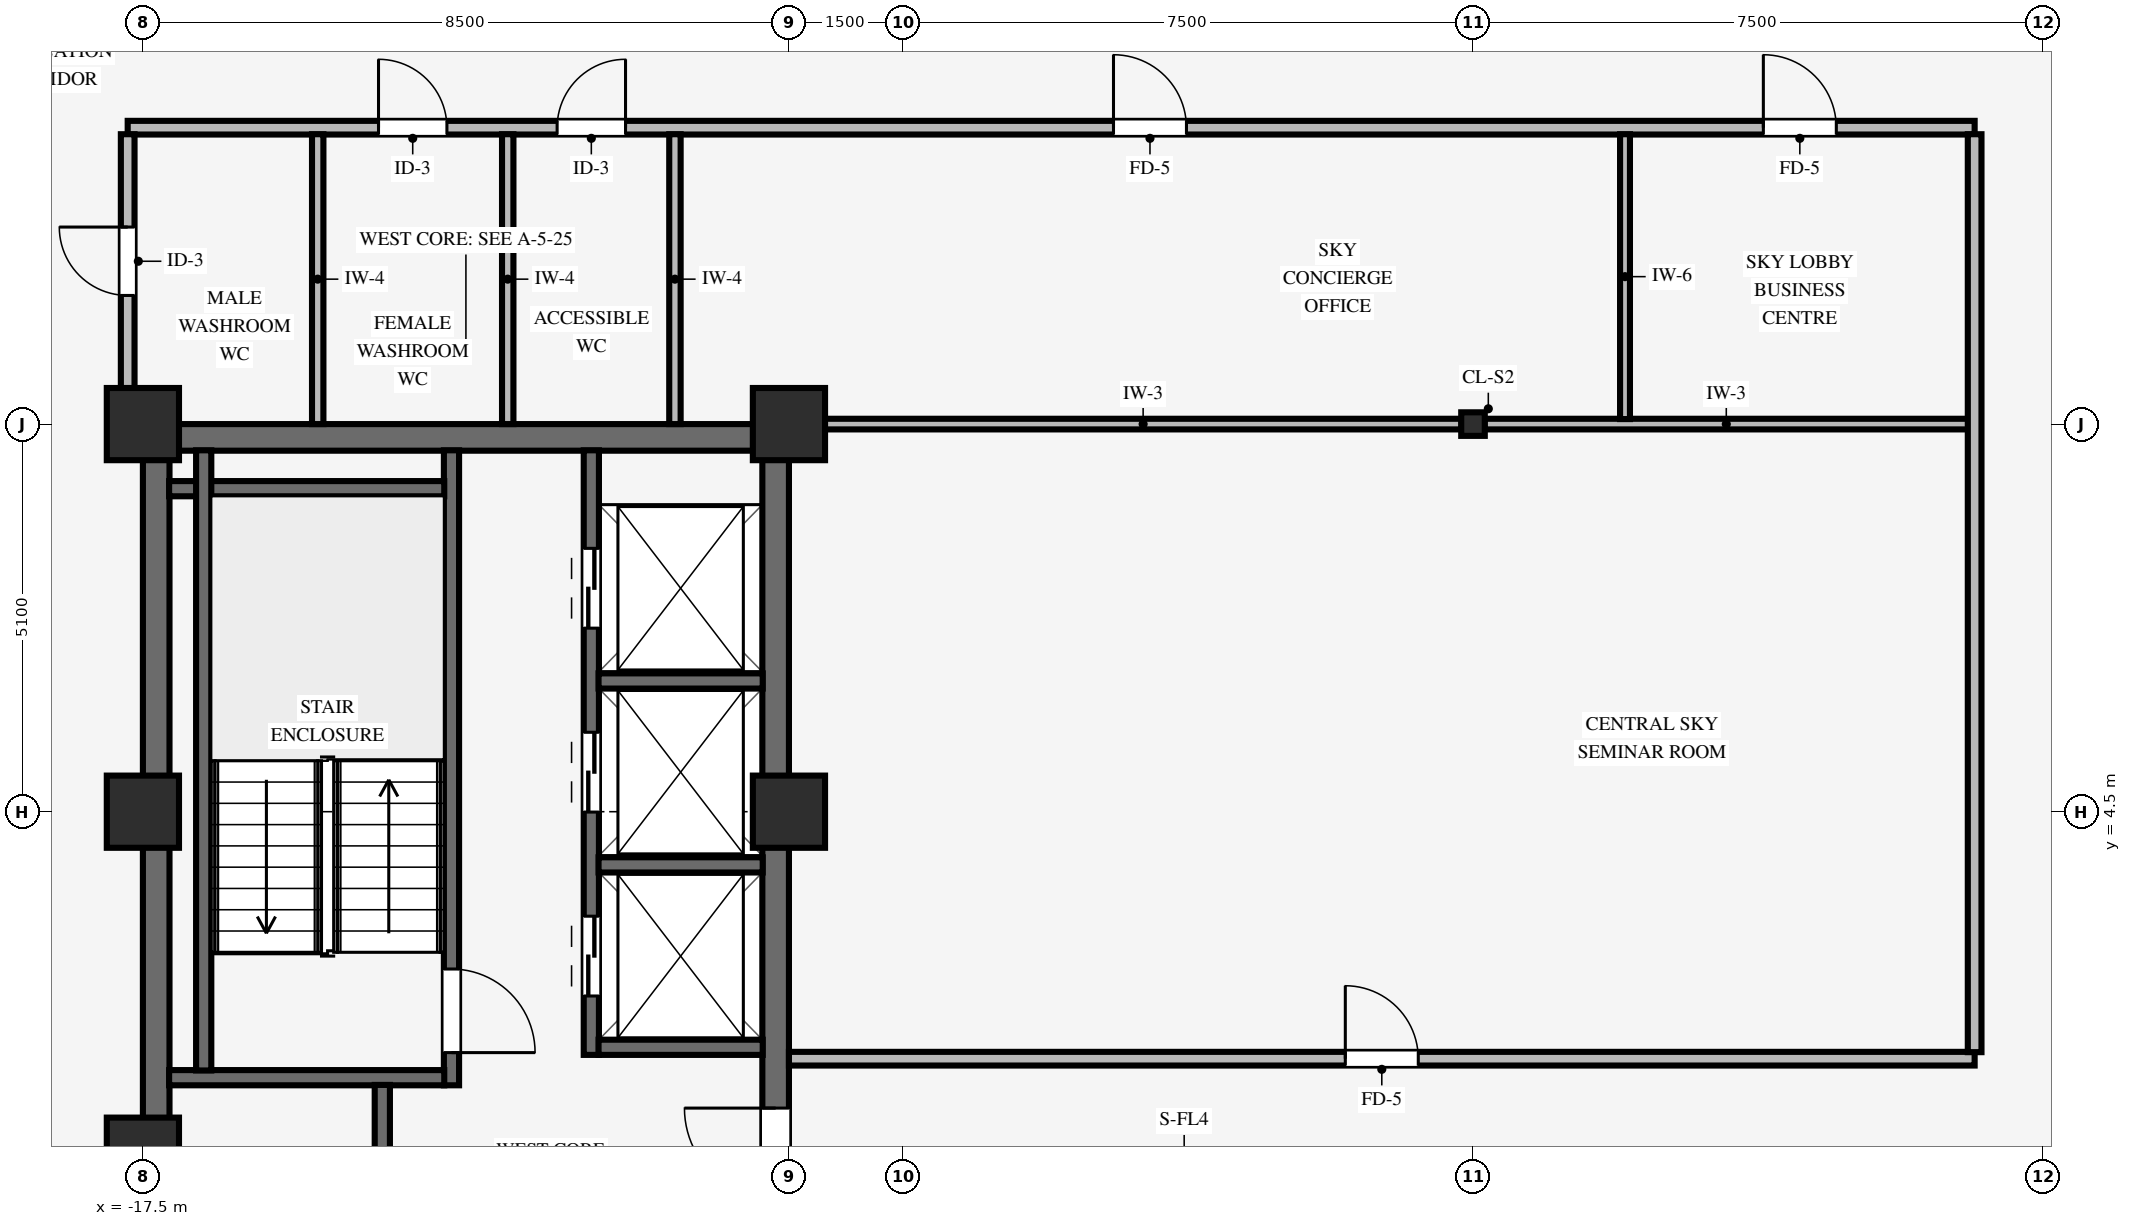
"""IFC4 building model, lengths in metres.
Left out: names, types, materials, properties, quantities, classifications, styles, units other than length and angle.
Written with IfcOpenShell. Run it as: python <this file> out.ifc"""

import sys

from ifc_helpers import new_model, si_unit, direction, frame, frame_2d, origin, origin_2d, place, context, subcontext, project, spatial, rectangle, i_section, extrude, source, transform, mapped, element, fill, save


model = new_model("IFC4")
c1 = context("Model", 3, precision=1e-05, world=origin(), true_north=direction((0.0, 1.0)))
c2 = subcontext(c1, "Body", "Model", "MODEL_VIEW")
j1 = project(units=[si_unit("LENGTHUNIT", "METRE"), si_unit("PLANEANGLEUNIT", "RADIAN")], contexts=[c1])
p1 = place(None, origin())
s1 = spatial("IfcSite", under=j1, at=p1, CompositionType="ELEMENT")
p2 = place(p1, origin())
s2 = spatial("IfcBuilding", under=s1, at=p2, CompositionType="ELEMENT")
p3 = place(p2, frame((0.0, 0.0, 223.75)))
s3 = spatial("IfcBuildingStorey", under=s2, at=p3, CompositionType="ELEMENT", Elevation=223.75)
p4 = place(p3, frame((-17.5, 9.425, 0.0), z_axis=(0.0, 0.0, 1.0), x_axis=(1.0, 0.0, 0.0)))
e1 = element("IfcWall", 1, at=p4, inside=s3, PredefinedType="SHEAR", context=c2, shape_type="SweptSolid", body=[
    extrude(rectangle(XDim=8.5, YDim=0.35, at=frame_2d((4.25, 0.0))), origin(), (0.0, 0.0, 1.0), 3.37),
])
p5 = place(p3, frame((-17.325, -9.255, 0.0), z_axis=(0.0, 0.0, 1.0), x_axis=(0.0, 1.0, 0.0)))
e2 = element("IfcWall", 2, at=p5, inside=s3, PredefinedType="SHEAR", context=c2, shape_type="SweptSolid", body=[
    extrude(rectangle(XDim=18.51, YDim=0.35, at=frame_2d((9.255, 0.0))), origin(), (0.0, 0.0, 1.0), 3.37),
])
p6 = place(p3, frame((-9.175, -9.255, 0.0), z_axis=(0.0, 0.0, 1.0), x_axis=(0.0, 1.0, 0.0)))
e3 = element("IfcWall", 3, at=p6, inside=s3, PredefinedType="SHEAR", context=c2, shape_type="SweptSolid", body=[
    extrude(rectangle(XDim=18.51, YDim=0.35, at=frame_2d((9.255, 0.0))), origin(), (0.0, 0.0, 1.0), 3.37),
])
p7 = place(p6, frame((8.655, 0.0, 0.0)))
e4 = element("IfcOpeningElement", 4, at=p7, cuts=e3, PredefinedType="OPENING", context=c2, shape_type="SweptSolid", body=[
    extrude(rectangle(XDim=1.2, YDim=2.15, at=frame_2d((0.6, 1.075))), frame((0.0, 0.185, 0.0), z_axis=(0.0, -1.0, 0.0), x_axis=(1.0, 0.0, 0.0)), (0.0, 0.0, 1.0), 0.37),
])
for number, where, z_axis, x_axis in (
    (5, (-17.5, 4.5, 0.0), (0.0, 0.0, 1.0), (1.0, 0.0, 0.0)),
    (6, (-17.5, 9.6, 0.0), (0.0, 0.0, 1.0), (1.0, 0.0, 0.0)),
    (7, (-9.0, 4.5, 0.0), (0.0, 0.0, 1.0), (1.0, 0.0, 0.0)),
    (8, (-9.0, 9.6, 0.0), (0.0, 0.0, 1.0), (1.0, 0.0, 0.0)),
    (9, (-17.5, 0.0, 0.0), (0.0, 0.0, 1.0), (1.0, 0.0, 0.0)),
):
    element("IfcColumn", number, at=place(p3, frame(where, z_axis=z_axis, x_axis=x_axis)), inside=s3, PredefinedType="COLUMN", context=c2, shape_type="SweptSolid", body=[
        extrude(rectangle(XDim=0.95, YDim=0.95, at=origin_2d()), origin(), (0.0, 0.0, 1.0), 3.37),
    ])
p8 = place(p3, frame((0.0, 9.6, 0.0), z_axis=(0.0, 0.0, 1.0), x_axis=(1.0, 0.0, 0.0)))
e10 = element("IfcColumn", 10, at=p8, inside=s3, PredefinedType="COLUMN", context=c2, shape_type="SweptSolid", body=[
    extrude(i_section(OverallWidth=0.31, OverallDepth=0.31, WebThickness=0.015, FlangeThickness=0.015, FilletRadius=0.015, at=origin_2d()), origin(), (0.0, 0.0, 1.0), 3.37),
])
p9 = place(p3, frame((-13.44, 0.9, 0.0), z_axis=(0.0, 0.0, 1.0), x_axis=(0.0, 1.0, 0.0)))
e11 = element("IfcWall", 11, at=p9, inside=s3, PredefinedType="SHEAR", context=c2, shape_type="SweptSolid", body=[
    extrude(rectangle(XDim=8.355, YDim=0.2, at=frame_2d((4.177, 0.0))), origin(), (0.0, 0.0, 1.0), 3.37),
])
p10 = place(p9, frame((1.53, 0.0, 0.0), z_axis=(0.0, 0.0, 1.0), x_axis=(-1.0, 0.0, 0.0)))
e12 = element("IfcOpeningElement", 12, at=p10, cuts=e11, PredefinedType="OPENING", context=c2, shape_type="SweptSolid", body=[
    extrude(rectangle(XDim=1.1, YDim=2.15, at=frame_2d((0.55, 1.075))), frame((0.0, 0.11, 0.0), z_axis=(0.0, -1.0, 0.0), x_axis=(1.0, 0.0, 0.0)), (0.0, 0.0, 1.0), 0.22),
])
for number, where, z_axis, x_axis in (
    (13, (-17.155, 1.0, 0.0), (0.0, 0.0, 1.0), (1.0, 0.0, 0.0)),
    (14, (-17.155, 8.75, 0.0), (0.0, 0.0, 1.0), (1.0, 0.0, 0.0)),
):
    element("IfcWall", number, at=place(p3, frame(where, z_axis=z_axis, x_axis=x_axis)), inside=s3, PredefinedType="SHEAR", context=c2, shape_type="SweptSolid", body=[
        extrude(rectangle(XDim=3.62, YDim=0.2, at=frame_2d((1.81, 0.0))), origin(), (0.0, 0.0, 1.0), 3.37),
    ])
p11 = place(p3, frame((-16.7, 1.095, 0.0), z_axis=(0.0, 0.0, 1.0), x_axis=(0.0, 1.0, 0.0)))
e15 = element("IfcWall", 15, at=p11, inside=s3, PredefinedType="SHEAR", context=c2, shape_type="SweptSolid", body=[
    extrude(rectangle(XDim=8.16, YDim=0.2, at=frame_2d((4.08, 0.0))), origin(), (0.0, 0.0, 1.0), 3.37),
])
p12 = place(p3, frame((-14.35, -6.2, 0.0), z_axis=(0.0, 0.0, 1.0), x_axis=(0.0, 1.0, 0.0)))
e16 = element("IfcWall", 16, at=p12, inside=s3, PredefinedType="SHEAR", context=c2, shape_type="SweptSolid", body=[
    extrude(rectangle(XDim=7.105, YDim=0.2, at=frame_2d((3.552, 0.0))), origin(), (0.0, 0.0, 1.0), 3.37),
])
p13 = place(p12, frame((5.69, 0.0, 0.0), z_axis=(0.0, 0.0, 1.0), x_axis=(-1.0, 0.0, 0.0)))
e17 = element("IfcOpeningElement", 17, at=p13, cuts=e16, PredefinedType="OPENING", context=c2, shape_type="SweptSolid", body=[
    extrude(rectangle(XDim=0.88, YDim=2.1, at=frame_2d((0.44, 1.05))), frame((0.0, 0.11, 0.0), z_axis=(0.0, -1.0, 0.0), x_axis=(1.0, 0.0, 0.0)), (0.0, 0.0, 1.0), 0.22),
])
p14 = place(p12, frame((1.15, 0.0, 0.0)))
e18 = element("IfcOpeningElement", 18, at=p14, cuts=e16, PredefinedType="OPENING", context=c2, shape_type="SweptSolid", body=[
    extrude(rectangle(XDim=1.3, YDim=2.2, at=frame_2d((0.65, 1.1))), frame((0.0, 0.11, 0.0), z_axis=(0.0, -1.0, 0.0), x_axis=(1.0, 0.0, 0.0)), (0.0, 0.0, 1.0), 0.22),
])
p15 = place(p3, frame((-11.6, 1.3, 0.0), z_axis=(0.0, 0.0, 1.0), x_axis=(0.0, 1.0, 0.0)))
e19 = element("IfcWall", 19, at=p15, inside=s3, PredefinedType="SHEAR", context=c2, shape_type="SweptSolid", body=[
    extrude(rectangle(XDim=7.955, YDim=0.2, at=frame_2d((3.978, 0.0))), origin(), (0.0, 0.0, 1.0), 3.37),
])
p16 = place(p15, frame((0.775, 0.0, 0.0)))
e20 = element("IfcOpeningElement", 20, at=p16, cuts=e19, PredefinedType="OPENING", context=c2, shape_type="SweptSolid", body=[
    extrude(rectangle(XDim=1.05, YDim=2.15, at=frame_2d((0.525, 1.075))), frame((0.0, 0.11, 0.0), z_axis=(0.0, -1.0, 0.0), x_axis=(1.0, 0.0, 0.0)), (0.0, 0.0, 1.0), 0.22),
])
p17 = place(p15, frame((3.195, 0.0, 0.0)))
e21 = element("IfcOpeningElement", 21, at=p17, cuts=e19, PredefinedType="OPENING", context=c2, shape_type="SweptSolid", body=[
    extrude(rectangle(XDim=1.05, YDim=2.15, at=frame_2d((0.525, 1.075))), frame((0.0, 0.11, 0.0), z_axis=(0.0, -1.0, 0.0), x_axis=(1.0, 0.0, 0.0)), (0.0, 0.0, 1.0), 0.22),
])
p18 = place(p15, frame((5.615, 0.0, 0.0)))
e22 = element("IfcOpeningElement", 22, at=p18, cuts=e19, PredefinedType="OPENING", context=c2, shape_type="SweptSolid", body=[
    extrude(rectangle(XDim=1.05, YDim=2.15, at=frame_2d((0.525, 1.075))), frame((0.0, 0.11, 0.0), z_axis=(0.0, -1.0, 0.0), x_axis=(1.0, 0.0, 0.0)), (0.0, 0.0, 1.0), 0.22),
])
for number, where, z_axis, x_axis in (
    (23, (-11.505, 1.4, 0.0), (0.0, 0.0, 1.0), (1.0, 0.0, 0.0)),
    (24, (-11.505, 3.8, 0.0), (0.0, 0.0, 1.0), (1.0, 0.0, 0.0)),
    (25, (-11.505, 6.22, 0.0), (0.0, 0.0, 1.0), (1.0, 0.0, 0.0)),
):
    element("IfcWall", number, at=place(p3, frame(where, z_axis=z_axis, x_axis=x_axis)), inside=s3, PredefinedType="SHEAR", context=c2, shape_type="SweptSolid", body=[
        extrude(rectangle(XDim=2.16, YDim=0.2, at=frame_2d((1.08, 0.0))), origin(), (0.0, 0.0, 1.0), 3.37),
    ])
p19 = place(p3, frame((-9.0, 1.25, 0.0), z_axis=(0.0, 0.0, 1.0), x_axis=(1.0, 0.0, 0.0)))
e26 = element("IfcWall", 26, at=p19, inside=s3, PredefinedType="PARTITIONING", context=c2, shape_type="SweptSolid", body=[
    extrude(rectangle(XDim=15.6, YDim=0.18, at=frame_2d((7.8, 0.0))), origin(), (0.0, 0.0, 1.0), 3.36),
])
p20 = place(p19, frame((7.32, 0.0, 0.0)))
e27 = element("IfcOpeningElement", 27, at=p20, cuts=e26, PredefinedType="OPENING", context=c2, shape_type="SweptSolid", body=[
    extrude(rectangle(XDim=0.96, YDim=2.1, at=frame_2d((0.48, 1.05))), frame((0.0, 0.1, 0.0), z_axis=(0.0, -1.0, 0.0), x_axis=(1.0, 0.0, 0.0)), (0.0, 0.0, 1.0), 0.2),
])
p21 = place(p3, frame((-8.529, 9.6, 0.0), z_axis=(0.0, 0.0, 1.0), x_axis=(1.0, 0.0, 0.0)))
e28 = element("IfcWall", 28, at=p21, inside=s3, PredefinedType="PARTITIONING", context=c2, shape_type="SweptSolid", body=[
    extrude(rectangle(XDim=8.378, YDim=0.14, at=frame_2d((4.189, 0.0))), origin(), (0.0, 0.0, 1.0), 2.405),
])
p22 = place(p3, frame((0.151, 9.6, 0.0), z_axis=(0.0, 0.0, 1.0), x_axis=(1.0, 0.0, 0.0)))
e29 = element("IfcWall", 29, at=p22, inside=s3, PredefinedType="PARTITIONING", context=c2, shape_type="SweptSolid", body=[
    extrude(rectangle(XDim=6.363, YDim=0.14, at=frame_2d((3.182, 0.0))), origin(), (0.0, 0.0, 1.0), 2.405),
])
p23 = place(p3, frame((-17.7, 13.5, 0.0), z_axis=(0.0, 0.0, 1.0), x_axis=(1.0, 0.0, 0.0)))
e30 = element("IfcWall", 30, at=p23, inside=s3, PredefinedType="PARTITIONING", context=c2, shape_type="SweptSolid", body=[
    extrude(rectangle(XDim=24.3, YDim=0.18, at=frame_2d((12.15, 0.0))), origin(), (0.0, 0.0, 1.0), 3.049),
])
p24 = place(p23, frame((12.97, 0.0, 0.0)))
e31 = element("IfcOpeningElement", 31, at=p24, cuts=e30, PredefinedType="OPENING", context=c2, shape_type="SweptSolid", body=[
    extrude(rectangle(XDim=0.96, YDim=2.1, at=frame_2d((0.48, 1.05))), frame((0.0, 0.1, 0.0), z_axis=(0.0, -1.0, 0.0), x_axis=(1.0, 0.0, 0.0)), (0.0, 0.0, 1.0), 0.2),
])
p25 = place(p23, frame((21.52, 0.0, 0.0)))
e32 = element("IfcOpeningElement", 32, at=p25, cuts=e30, PredefinedType="OPENING", context=c2, shape_type="SweptSolid", body=[
    extrude(rectangle(XDim=0.96, YDim=2.1, at=frame_2d((0.48, 1.05))), frame((0.0, 0.1, 0.0), z_axis=(0.0, -1.0, 0.0), x_axis=(1.0, 0.0, 0.0)), (0.0, 0.0, 1.0), 0.2),
])
p26 = place(p23, frame((3.3, 0.0, 0.0)))
e33 = element("IfcOpeningElement", 33, at=p26, cuts=e30, PredefinedType="OPENING", context=c2, shape_type="SweptSolid", body=[
    extrude(rectangle(XDim=0.9, YDim=2.1, at=frame_2d((0.45, 1.05))), frame((0.0, 0.1, 0.0), z_axis=(0.0, -1.0, 0.0), x_axis=(1.0, 0.0, 0.0)), (0.0, 0.0, 1.0), 0.2),
])
p27 = place(p23, frame((5.65, 0.0, 0.0)))
e34 = element("IfcOpeningElement", 34, at=p27, cuts=e30, PredefinedType="OPENING", context=c2, shape_type="SweptSolid", body=[
    extrude(rectangle(XDim=0.9, YDim=2.1, at=frame_2d((0.45, 1.05))), frame((0.0, 0.1, 0.0), z_axis=(0.0, -1.0, 0.0), x_axis=(1.0, 0.0, 0.0)), (0.0, 0.0, 1.0), 0.2),
])
p28 = place(p3, frame((-17.7, 10.071, 0.0), z_axis=(0.0, 0.0, 1.0), x_axis=(0.0, 1.0, 0.0)))
e35 = element("IfcWall", 35, at=p28, inside=s3, PredefinedType="PARTITIONING", context=c2, shape_type="SweptSolid", body=[
    extrude(rectangle(XDim=3.343, YDim=0.18, at=frame_2d((1.671, 0.0))), origin(), (0.0, 0.0, 1.0), 2.892),
])
p29 = place(p28, frame((1.221, 0.0, 0.0)))
e36 = element("IfcOpeningElement", 36, at=p29, cuts=e35, PredefinedType="OPENING", context=c2, shape_type="SweptSolid", body=[
    extrude(rectangle(XDim=0.9, YDim=2.1, at=frame_2d((0.45, 1.05))), frame((0.0, 0.1, 0.0), z_axis=(0.0, -1.0, 0.0), x_axis=(1.0, 0.0, 0.0)), (0.0, 0.0, 1.0), 0.2),
])
for number, where, z_axis, x_axis in (
    (37, (-15.2, 9.6, 0.0), (0.0, 0.0, 1.0), (0.0, 1.0, 0.0)),
    (38, (-12.7, 9.6, 0.0), (0.0, 0.0, 1.0), (0.0, 1.0, 0.0)),
    (39, (-10.5, 9.6, 0.0), (0.0, 0.0, 1.0), (0.0, 1.0, 0.0)),
):
    element("IfcWall", number, at=place(p3, frame(where, z_axis=z_axis, x_axis=x_axis)), inside=s3, PredefinedType="PARTITIONING", context=c2, shape_type="SweptSolid", body=[
        extrude(rectangle(XDim=3.814, YDim=0.15, at=frame_2d((1.907, 0.0))), origin(), (0.0, 0.0, 1.0), 3.36),
    ])
p30 = place(p3, frame((2.0, 9.666, 0.0), z_axis=(0.0, 0.0, 1.0), x_axis=(0.0, 1.0, 0.0)))
e40 = element("IfcWall", 40, at=p30, inside=s3, PredefinedType="PARTITIONING", context=c2, shape_type="SweptSolid", body=[
    extrude(rectangle(XDim=3.748, YDim=0.13, at=frame_2d((1.874, 0.0))), origin(), (0.0, 0.0, 1.0), 3.36),
])
p31 = place(p3, frame((6.6, 1.336, 0.0), z_axis=(0.0, 0.0, 1.0), x_axis=(0.0, 1.0, 0.0)))
e41 = element("IfcWall", 41, at=p31, inside=s3, PredefinedType="PARTITIONING", context=c2, shape_type="SweptSolid", body=[
    extrude(rectangle(XDim=12.078, YDim=0.18, at=frame_2d((6.039, 0.0))), origin(), (0.0, 0.0, 1.0), 3.36),
])
m1 = source(origin(), c2, "Body", "SweptSolid", [
    extrude(rectangle(XDim=1.1, YDim=2.15, at=frame_2d((0.55, 1.075))), frame((0.0, 0.025, 0.0), z_axis=(0.0, -1.0, 0.0), x_axis=(1.0, 0.0, 0.0)), (0.0, 0.0, 1.0), 0.05),
])
p32 = place(p10, origin())
e42 = element("IfcDoor", 42, at=p32, inside=s3, OperationType="SINGLE_SWING_RIGHT", PredefinedType="DOOR", context=c2, shape_type="MappedRepresentation", body=[
    mapped(m1, transform((0.0, 0.0, 0.0), scale=1.0)),
])
fill(e12, e42)
m2 = source(origin(), c2, "Body", "SweptSolid", [
    extrude(rectangle(XDim=1.2, YDim=2.15, at=frame_2d((0.6, 1.075))), frame((0.0, 0.025, 0.0), z_axis=(0.0, -1.0, 0.0), x_axis=(1.0, 0.0, 0.0)), (0.0, 0.0, 1.0), 0.05),
])
p33 = place(p7, origin())
e43 = element("IfcDoor", 43, at=p33, inside=s3, OperationType="SINGLE_SWING_RIGHT", PredefinedType="DOOR", context=c2, shape_type="MappedRepresentation", body=[
    mapped(m2, transform((0.0, 0.0, 0.0), scale=1.0)),
])
fill(e4, e43)
m3 = source(origin(), c2, "Body", "SweptSolid", [
    extrude(rectangle(XDim=1.05, YDim=2.15, at=frame_2d((0.525, 1.075))), frame((0.0, 0.025, 0.0), z_axis=(0.0, -1.0, 0.0), x_axis=(1.0, 0.0, 0.0)), (0.0, 0.0, 1.0), 0.05),
])
p34 = place(p16, origin())
e44 = element("IfcDoor", 44, at=p34, inside=s3, OperationType="DOUBLE_DOOR_SLIDING", PredefinedType="DOOR", context=c2, shape_type="MappedRepresentation", body=[
    mapped(m3, transform((0.0, 0.0, 0.0), scale=1.0)),
])
fill(e20, e44)
p35 = place(p17, origin())
e45 = element("IfcDoor", 45, at=p35, inside=s3, OperationType="DOUBLE_DOOR_SLIDING", PredefinedType="DOOR", context=c2, shape_type="MappedRepresentation", body=[
    mapped(m3, transform((0.0, 0.0, 0.0), scale=1.0)),
])
fill(e21, e45)
p36 = place(p18, origin())
e46 = element("IfcDoor", 46, at=p36, inside=s3, OperationType="DOUBLE_DOOR_SLIDING", PredefinedType="DOOR", context=c2, shape_type="MappedRepresentation", body=[
    mapped(m3, transform((0.0, 0.0, 0.0), scale=1.0)),
])
fill(e22, e46)
m4 = source(origin(), c2, "Body", "SweptSolid", [
    extrude(rectangle(XDim=0.96, YDim=2.1, at=frame_2d((0.48, 1.05))), frame((0.0, 0.025, 0.0), z_axis=(0.0, -1.0, 0.0), x_axis=(1.0, 0.0, 0.0)), (0.0, 0.0, 1.0), 0.05),
])
p37 = place(p20, origin())
e47 = element("IfcDoor", 47, at=p37, inside=s3, OperationType="SINGLE_SWING_LEFT", PredefinedType="DOOR", context=c2, shape_type="MappedRepresentation", body=[
    mapped(m4, transform((0.0, 0.0, 0.0), scale=1.0)),
])
fill(e27, e47)
p38 = place(p24, origin())
e48 = element("IfcDoor", 48, at=p38, inside=s3, OperationType="SINGLE_SWING_LEFT", PredefinedType="DOOR", context=c2, shape_type="MappedRepresentation", body=[
    mapped(m4, transform((0.0, 0.0, 0.0), scale=1.0)),
])
fill(e31, e48)
p39 = place(p25, origin())
e49 = element("IfcDoor", 49, at=p39, inside=s3, OperationType="SINGLE_SWING_LEFT", PredefinedType="DOOR", context=c2, shape_type="MappedRepresentation", body=[
    mapped(m4, transform((0.0, 0.0, 0.0), scale=1.0)),
])
fill(e32, e49)
m5 = source(origin(), c2, "Body", "SweptSolid", [
    extrude(rectangle(XDim=0.9, YDim=2.1, at=frame_2d((0.45, 1.05))), frame((0.0, 0.025, 0.0), z_axis=(0.0, -1.0, 0.0), x_axis=(1.0, 0.0, 0.0)), (0.0, 0.0, 1.0), 0.05),
])
p40 = place(p29, origin())
e50 = element("IfcDoor", 50, at=p40, inside=s3, OperationType="SINGLE_SWING_RIGHT", PredefinedType="DOOR", context=c2, shape_type="MappedRepresentation", body=[
    mapped(m5, transform((0.0, 0.0, 0.0), scale=1.0)),
])
fill(e36, e50)
p41 = place(p26, origin())
e51 = element("IfcDoor", 51, at=p41, inside=s3, OperationType="SINGLE_SWING_LEFT", PredefinedType="DOOR", context=c2, shape_type="MappedRepresentation", body=[
    mapped(m5, transform((0.0, 0.0, 0.0), scale=1.0)),
])
fill(e33, e51)
p42 = place(p27, origin())
e52 = element("IfcDoor", 52, at=p42, inside=s3, OperationType="SINGLE_SWING_RIGHT", PredefinedType="DOOR", context=c2, shape_type="MappedRepresentation", body=[
    mapped(m5, transform((0.0, 0.0, 0.0), scale=1.0)),
])
fill(e34, e52)
save(model, sys.argv[1])
